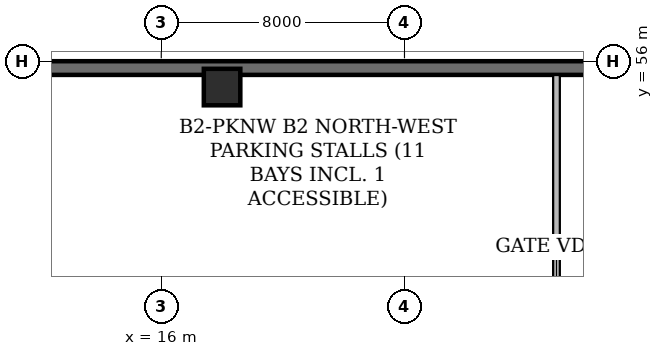
"""IFC4 building model, lengths in metres.
Left out: names, types, materials, properties, quantities, classifications, styles, units other than length and angle.
Written with IfcOpenShell. Run it as: python <this file> out.ifc"""

import sys

from ifc_helpers import new_model, si_unit, direction, frame, frame_2d, origin, origin_2d, place, context, subcontext, project, spatial, rectangle, hollow_rectangle, extrude, element, save


model = new_model("IFC4")
c1 = context("Model", 3, precision=1e-05, world=origin(), true_north=direction((0.0, 1.0)))
c2 = subcontext(c1, "Body", "Model", "MODEL_VIEW")
j1 = project(units=[si_unit("LENGTHUNIT", "METRE"), si_unit("PLANEANGLEUNIT", "RADIAN")], contexts=[c1])
p1 = place(None, origin())
s1 = spatial("IfcSite", under=j1, at=p1, CompositionType="ELEMENT")
p2 = place(p1, origin())
s2 = spatial("IfcBuilding", under=s1, at=p2, CompositionType="ELEMENT")
p3 = place(p2, frame((0.0, 0.0, -9.0)))
s3 = spatial("IfcBuildingStorey", under=s2, at=p3, CompositionType="ELEMENT", Elevation=-9.0)
p4 = place(p3, frame((18.0, 55.15, 0.0), z_axis=(0.0, 0.0, 1.0), x_axis=(1.0, 0.0, 0.0)))
e1 = element("IfcColumn", 1, at=p4, inside=s3, PredefinedType="COLUMN", context=c2, shape_type="SweptSolid", body=[
    extrude(hollow_rectangle(XDim=1.2, YDim=1.2, WallThickness=0.06, at=origin_2d()), origin(), (0.0, 0.0, 1.0), 4.5),
])
p5 = place(p3, frame((5.243, 55.775, 0.0), z_axis=(0.0, 0.0, 1.0), x_axis=(1.0, 0.0, 0.0)))
e2 = element("IfcWall", 2, at=p5, inside=s3, PredefinedType="USERDEFINED", context=c2, shape_type="SweptSolid", body=[
    extrude(rectangle(XDim=45.664, YDim=0.45, at=frame_2d((22.832, 0.0))), origin(), (0.0, 0.0, 1.0), 4.18),
])
p6 = place(p3, frame((29.0, 37.154, 0.0), z_axis=(0.0, 0.0, 1.0), x_axis=(0.0, 1.0, 0.0)))
e3 = element("IfcWall", 3, at=p6, inside=s3, PredefinedType="STANDARD", context=c2, shape_type="SweptSolid", body=[
    extrude(rectangle(XDim=18.392, YDim=0.22, at=frame_2d((9.196, 0.0))), origin(), (0.0, 0.0, 1.0), 4.18),
])
p7 = place(p6, frame((7.65, 0.0, 0.0)))
e4 = element("IfcOpeningElement", 4, at=p7, cuts=e3, PredefinedType="OPENING", context=c2, shape_type="SweptSolid", body=[
    extrude(rectangle(XDim=3.2, YDim=2.7, at=frame_2d((1.6, 1.35))), frame((0.0, 0.12, 0.0), z_axis=(0.0, -1.0, 0.0), x_axis=(1.0, 0.0, 0.0)), (0.0, 0.0, 1.0), 0.24),
])
save(model, sys.argv[1])
